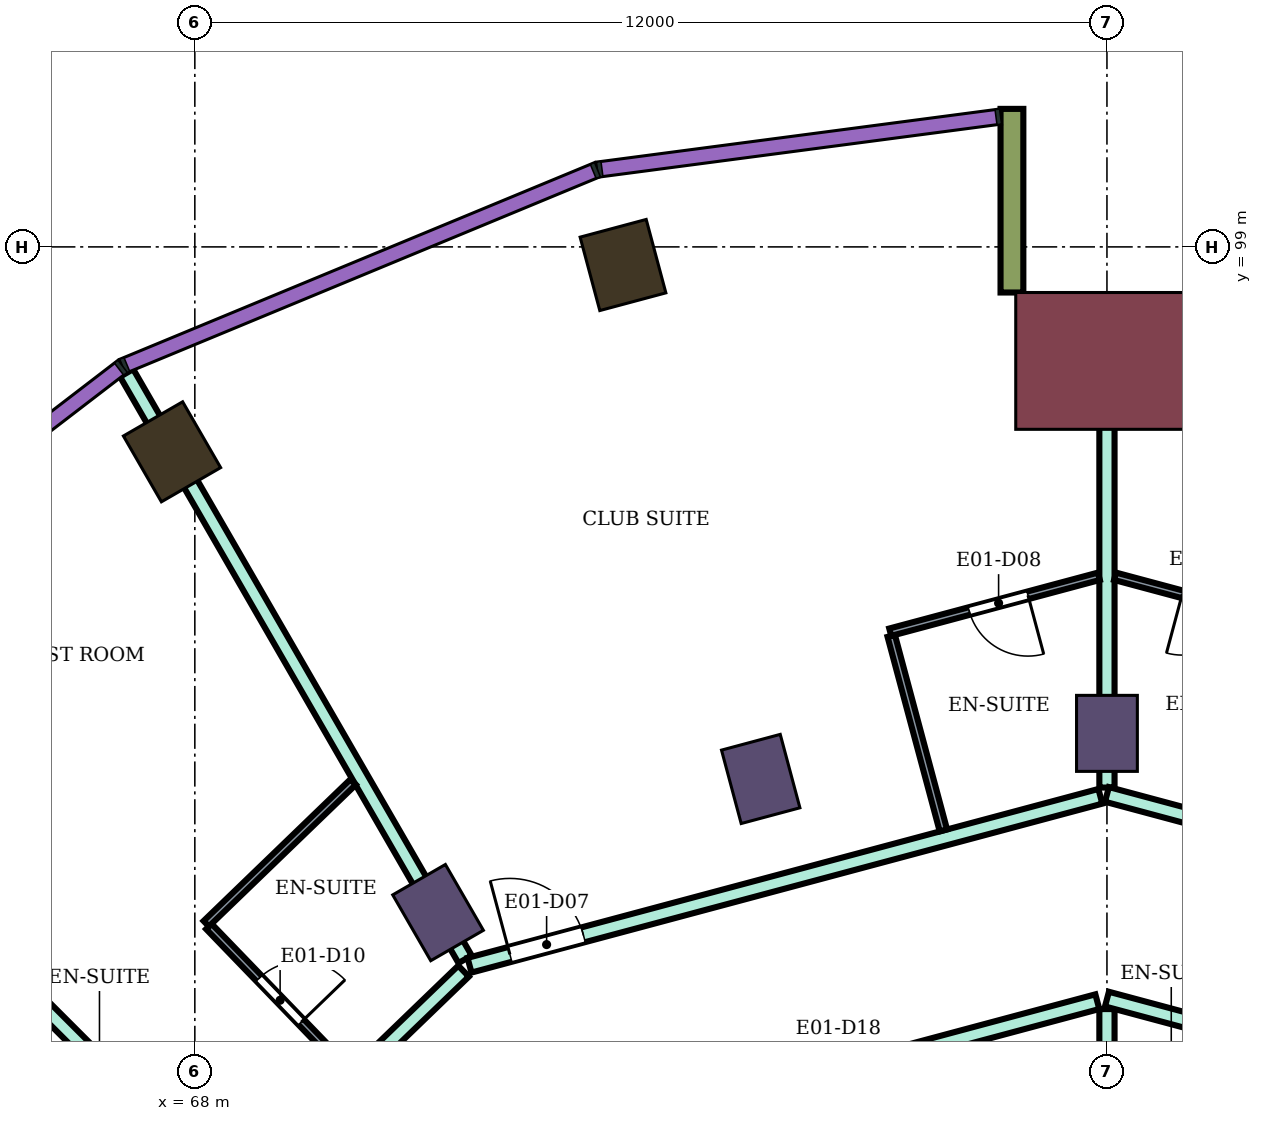
"""IFC4 building model, lengths in metres.
Left out: names, types, materials, properties, quantities, classifications, styles, units other than length and angle.
Written with IfcOpenShell. Run it as: python <this file> out.ifc"""

import sys

from ifc_helpers import new_model, si_unit, direction, frame, frame_2d, origin, origin_2d, place, context, subcontext, project, spatial, rectangle, extrude, element, fill, save


model = new_model("IFC4")
c1 = context("Model", 3, precision=1e-05, world=origin(), true_north=direction((0.0, 1.0)))
c2 = subcontext(c1, "Body", "Model", "MODEL_VIEW")
j1 = project(units=[si_unit("LENGTHUNIT", "METRE"), si_unit("PLANEANGLEUNIT", "RADIAN")], contexts=[c1])
p1 = place(None, origin())
s1 = spatial("IfcSite", under=j1, at=p1, CompositionType="ELEMENT")
p2 = place(p1, origin())
s2 = spatial("IfcBuilding", under=s1, at=p2, CompositionType="ELEMENT")
p3 = place(p2, frame((0.0, 0.0, 122.4)))
s3 = spatial("IfcBuildingStorey", under=s2, at=p3, CompositionType="ELEMENT", Elevation=122.4)
for number, where, z_axis, x_axis in (
    (1, (73.633, 98.762, 0.0), (0.0, 0.0, 1.0), (-0.259, 0.966, 0.0)),
    (2, (67.7, 96.304, 0.0), (0.0, 0.0, 1.0), (-0.5, 0.866, 0.0)),
):
    element("IfcColumn", number, at=place(p3, frame(where, z_axis=z_axis, x_axis=x_axis)), inside=s3, PredefinedType="COLUMN", context=c2, shape_type="SweptSolid", body=[
        extrude(rectangle(XDim=1.0, YDim=0.9, at=origin_2d()), origin(), (0.0, 0.0, 1.0), 3.9),
    ])
for number, where, z_axis, x_axis in (
    (3, (80.0, 92.6, 0.0), (0.0, 0.0, 1.0), (0.0, 1.0, 0.0)),
    (4, (75.445, 92.0, 0.0), (0.0, 0.0, 1.0), (-0.259, 0.966, 0.0)),
    (5, (71.2, 90.242, 0.0), (0.0, 0.0, 1.0), (-0.5, 0.866, 0.0)),
):
    element("IfcColumn", number, at=place(p3, frame(where, z_axis=z_axis, x_axis=x_axis)), inside=s3, PredefinedType="COLUMN", context=c2, shape_type="SweptSolid", body=[
        extrude(rectangle(XDim=1.0, YDim=0.8, at=origin_2d()), origin(), (0.0, 0.0, 1.0), 3.9),
    ])
p4 = place(p3, frame((80.0, 97.5, 0.0), z_axis=(0.0, 0.0, 1.0), x_axis=(0.0, 1.0, 0.0)))
e6 = element("IfcColumn", 6, at=p4, inside=s3, PredefinedType="COLUMN", context=c2, shape_type="SweptSolid", body=[
    extrude(rectangle(XDim=1.8, YDim=2.4, at=origin_2d()), origin(), (0.0, 0.0, 1.0), 3.9),
])
p5 = place(p3, frame((78.75, 98.4, 0.0), z_axis=(0.0, 0.0, 1.0), x_axis=(0.0, 1.0, 0.0)))
e7 = element("IfcWall", 7, at=p5, inside=s3, PredefinedType="NOTDEFINED", context=c2, shape_type="SweptSolid", body=[
    extrude(rectangle(XDim=2.416, YDim=0.3, at=frame_2d((1.208, 0.0))), origin(), (0.0, 0.0, 1.0), 3.9),
])
p6 = place(p3, frame((63.598, 91.408, 0.0), z_axis=(0.0, 0.0, 1.0), x_axis=(0.706963264491, -0.707250268759, 0.0)))
e8 = element("IfcWall", 8, at=p6, inside=s3, PredefinedType="PARTITIONING", context=c2, shape_type="SweptSolid", body=[
    extrude(rectangle(XDim=6.805, YDim=0.2, at=frame_2d((3.403, 0.0))), origin(), (0.0, 0.0, 1.0), 3.45),
])
p7 = place(p3, frame((66.797, 84.9, 0.0), z_axis=(0.0, 0.0, 1.0), x_axis=(0.719692092412, 0.694293376116, 0.0)))
e9 = element("IfcWall", 9, at=p7, inside=s3, PredefinedType="PARTITIONING", context=c2, shape_type="SweptSolid", body=[
    extrude(rectangle(XDim=6.584, YDim=0.2, at=frame_2d((3.292, 0.0))), origin(), (0.0, 0.0, 1.0), 3.45),
])
p8 = place(p7, frame((2.866, 0.0, 0.0)))
e10 = element("IfcOpeningElement", 10, at=p8, cuts=e9, PredefinedType="OPENING", context=c2, shape_type="SweptSolid", body=[
    extrude(rectangle(XDim=1.0, YDim=2.1, at=frame_2d((0.5, 1.05))), frame((0.0, 0.11, 0.0), z_axis=(0.0, -1.0, 0.0), x_axis=(1.0, 0.0, 0.0)), (0.0, 0.0, 1.0), 0.22),
])
p9 = place(p3, frame((67.102, 97.342, 0.0), z_axis=(0.0, 0.0, 1.0), x_axis=(0.499927298089, -0.866067374183, 0.0)))
e11 = element("IfcWall", 11, at=p9, inside=s3, PredefinedType="PARTITIONING", context=c2, shape_type="SweptSolid", body=[
    extrude(rectangle(XDim=8.907, YDim=0.2, at=frame_2d((4.454, 0.0))), origin(), (0.0, 0.0, 1.0), 3.45),
])
p10 = place(p3, frame((71.614, 89.55, 0.0), z_axis=(0.0, 0.0, 1.0), x_axis=(0.965967958589, 0.258661753994, 0.0)))
e12 = element("IfcWall", 12, at=p10, inside=s3, PredefinedType="PARTITIONING", context=c2, shape_type="SweptSolid", body=[
    extrude(rectangle(XDim=8.592, YDim=0.2, at=frame_2d((4.296, 0.0))), origin(), (0.0, 0.0, 1.0), 3.45),
])
p11 = place(p10, frame((0.55, 0.0, 0.0)))
e13 = element("IfcOpeningElement", 13, at=p11, cuts=e12, PredefinedType="OPENING", context=c2, shape_type="SweptSolid", body=[
    extrude(rectangle(XDim=1.0, YDim=2.1, at=frame_2d((0.5, 1.05))), frame((0.0, 0.11, 0.0), z_axis=(0.0, -1.0, 0.0), x_axis=(1.0, 0.0, 0.0)), (0.0, 0.0, 1.0), 0.22),
])
p12 = place(p3, frame((72.936, 87.211, 0.0), z_axis=(0.0, 0.0, 1.0), x_axis=(0.965917703859, 0.258849356521, 0.0)))
e14 = element("IfcWall", 14, at=p12, inside=s3, PredefinedType="PARTITIONING", context=c2, shape_type="SweptSolid", body=[
    extrude(rectangle(XDim=7.182, YDim=0.2, at=frame_2d((3.591, 0.0))), origin(), (0.0, 0.0, 1.0), 3.45),
])
p13 = place(p12, frame((2.757, 0.0, 0.0)))
e15 = element("IfcOpeningElement", 15, at=p13, cuts=e14, PredefinedType="OPENING", context=c2, shape_type="SweptSolid", body=[
    extrude(rectangle(XDim=1.8, YDim=2.1, at=frame_2d((0.9, 1.05))), frame((0.0, 0.11, 0.0), z_axis=(0.0, -1.0, 0.0), x_axis=(1.0, 0.0, 0.0)), (0.0, 0.0, 1.0), 0.22),
])
p14 = place(p3, frame((80.0, 82.7, 0.0), z_axis=(0.0, 0.0, 1.0), x_axis=(0.0, 1.0, 0.0)))
e16 = element("IfcWall", 16, at=p14, inside=s3, PredefinedType="PARTITIONING", context=c2, shape_type="SweptSolid", body=[
    extrude(rectangle(XDim=6.273, YDim=0.2, at=frame_2d((3.136, 0.0))), origin(), (0.0, 0.0, 1.0), 3.45),
])
p15 = place(p3, frame((80.0, 89.104, 0.0), z_axis=(0.0, 0.0, 1.0), x_axis=(0.965856548257, -0.259077455964, 0.0)))
e17 = element("IfcWall", 17, at=p15, inside=s3, PredefinedType="PARTITIONING", context=c2, shape_type="SweptSolid", body=[
    extrude(rectangle(XDim=7.173, YDim=0.2, at=frame_2d((3.586, 0.0))), origin(), (0.0, 0.0, 1.0), 3.45),
])
p16 = place(p15, frame((5.763, 0.0, 0.0)))
e18 = element("IfcOpeningElement", 18, at=p16, cuts=e17, PredefinedType="OPENING", context=c2, shape_type="SweptSolid", body=[
    extrude(rectangle(XDim=1.0, YDim=2.1, at=frame_2d((0.5, 1.05))), frame((0.0, 0.11, 0.0), z_axis=(0.0, -1.0, 0.0), x_axis=(1.0, 0.0, 0.0)), (0.0, 0.0, 1.0), 0.22),
])
p17 = place(p3, frame((80.0, 91.887, 0.0), z_axis=(0.0, 0.0, 1.0), x_axis=(0.0, 1.0, 0.0)))
e19 = element("IfcWall", 19, at=p17, inside=s3, PredefinedType="PARTITIONING", context=c2, shape_type="SweptSolid", body=[
    extrude(rectangle(XDim=6.312, YDim=0.2, at=frame_2d((3.156, 0.0))), origin(), (0.0, 0.0, 1.0), 3.45),
])
p18 = place(p3, frame((80.0, 91.797, 0.0), z_axis=(0.0, 0.0, 1.0), x_axis=(0.965857042792, -0.259075612301, 0.0)))
e20 = element("IfcWall", 20, at=p18, inside=s3, PredefinedType="PARTITIONING", context=c2, shape_type="SweptSolid", body=[
    extrude(rectangle(XDim=8.602, YDim=0.2, at=frame_2d((4.301, 0.0))), origin(), (0.0, 0.0, 1.0), 3.45),
])
p19 = place(p18, frame((4.877, 0.0, 0.0)))
e21 = element("IfcOpeningElement", 21, at=p19, cuts=e20, PredefinedType="OPENING", context=c2, shape_type="SweptSolid", body=[
    extrude(rectangle(XDim=1.0, YDim=2.1, at=frame_2d((0.5, 1.05))), frame((0.0, 0.11, 0.0), z_axis=(0.0, -1.0, 0.0), x_axis=(1.0, 0.0, 0.0)), (0.0, 0.0, 1.0), 0.22),
])
p20 = place(p18, frame((2.817, 0.0, 0.0)))
e22 = element("IfcOpeningElement", 22, at=p20, cuts=e20, PredefinedType="OPENING", context=c2, shape_type="SweptSolid", body=[
    extrude(rectangle(XDim=1.0, YDim=2.1, at=frame_2d((0.5, 1.05))), frame((0.0, 0.11, 0.0), z_axis=(0.0, -1.0, 0.0), x_axis=(1.0, 0.0, 0.0)), (0.0, 0.0, 1.0), 0.22),
])
p21 = place(p3, frame((68.185, 90.06, 0.0), z_axis=(0.0, 0.0, 1.0), x_axis=(0.69446127412, -0.719530081892, 0.0)))
e23 = element("IfcWall", 23, at=p21, inside=s3, PredefinedType="PARTITIONING", context=c2, shape_type="SweptSolid", body=[
    extrude(rectangle(XDim=2.649, YDim=0.1, at=frame_2d((1.324, 0.0))), origin(), (0.0, 0.0, 1.0), 3.45),
])
p22 = place(p21, frame((0.95, 0.0, 0.0)))
e24 = element("IfcOpeningElement", 24, at=p22, cuts=e23, PredefinedType="OPENING", context=c2, shape_type="SweptSolid", body=[
    extrude(rectangle(XDim=0.8, YDim=2.1, at=frame_2d((0.4, 1.05))), frame((0.0, 0.06, 0.0), z_axis=(0.0, -1.0, 0.0), x_axis=(1.0, 0.0, 0.0)), (0.0, 0.0, 1.0), 0.12),
])
p23 = place(p3, frame((68.15, 90.096, 0.0), z_axis=(0.0, 0.0, 1.0), x_axis=(0.719667544954, 0.694318820672, 0.0)))
e25 = element("IfcWall", 25, at=p23, inside=s3, PredefinedType="PARTITIONING", context=c2, shape_type="SweptSolid", body=[
    extrude(rectangle(XDim=2.687, YDim=0.1, at=frame_2d((1.344, 0.0))), origin(), (0.0, 0.0, 1.0), 3.45),
])
p24 = place(p3, frame((77.162, 93.883, 0.0), z_axis=(0.0, 0.0, 1.0), x_axis=(0.258998589493, -0.965877699629, 0.0)))
e26 = element("IfcWall", 26, at=p24, inside=s3, PredefinedType="PARTITIONING", context=c2, shape_type="SweptSolid", body=[
    extrude(rectangle(XDim=2.65, YDim=0.1, at=frame_2d((1.325, 0.0))), origin(), (0.0, 0.0, 1.0), 3.45),
])
p25 = place(p3, frame((77.149, 93.931, 0.0), z_axis=(0.0, 0.0, 1.0), x_axis=(0.965916219953, 0.258854893776, 0.0)))
e27 = element("IfcWall", 27, at=p25, inside=s3, PredefinedType="PARTITIONING", context=c2, shape_type="SweptSolid", body=[
    extrude(rectangle(XDim=2.842, YDim=0.1, at=frame_2d((1.421, 0.0))), origin(), (0.0, 0.0, 1.0), 3.45),
])
p26 = place(p25, frame((1.076, 0.0, 0.0)))
e28 = element("IfcOpeningElement", 28, at=p26, cuts=e27, PredefinedType="OPENING", context=c2, shape_type="SweptSolid", body=[
    extrude(rectangle(XDim=0.8, YDim=2.1, at=frame_2d((0.4, 1.05))), frame((0.0, 0.06, 0.0), z_axis=(0.0, -1.0, 0.0), x_axis=(1.0, 0.0, 0.0)), (0.0, 0.0, 1.0), 0.12),
])
p27 = place(p3, frame((80.106, 94.667, 0.0), z_axis=(0.0, 0.0, 1.0), x_axis=(0.965904298007, -0.258899376382, 0.0)))
e29 = element("IfcWall", 29, at=p27, inside=s3, PredefinedType="PARTITIONING", context=c2, shape_type="SweptSolid", body=[
    extrude(rectangle(XDim=2.69, YDim=0.1, at=frame_2d((1.345, 0.0))), origin(), (0.0, 0.0, 1.0), 3.45),
])
p28 = place(p27, frame((0.915, 0.0, 0.0)))
e30 = element("IfcOpeningElement", 30, at=p28, cuts=e29, PredefinedType="OPENING", context=c2, shape_type="SweptSolid", body=[
    extrude(rectangle(XDim=0.8, YDim=2.1, at=frame_2d((0.4, 1.05))), frame((0.0, 0.06, 0.0), z_axis=(0.0, -1.0, 0.0), x_axis=(1.0, 0.0, 0.0)), (0.0, 0.0, 1.0), 0.12),
])
p29 = place(p28, frame((0.8, 0.0, 0.0), z_axis=(0.0, 0.0, 1.0), x_axis=(-1.0, 0.0, 0.0)))
e31 = element("IfcDoor", 31, at=p29, inside=s3, OperationType="SINGLE_SWING_RIGHT", PredefinedType="DOOR", context=c2, shape_type="SweptSolid", body=[
    extrude(rectangle(XDim=0.8, YDim=2.1, at=frame_2d((0.4, 1.05))), frame((0.0, 0.025, 0.0), z_axis=(0.0, -1.0, 0.0), x_axis=(1.0, 0.0, 0.0)), (0.0, 0.0, 1.0), 0.05),
])
fill(e30, e31)
p30 = place(p11, origin())
e32 = element("IfcDoor", 32, at=p30, inside=s3, OperationType="SINGLE_SWING_LEFT", PredefinedType="DOOR", context=c2, shape_type="SweptSolid", body=[
    extrude(rectangle(XDim=1.0, YDim=2.1, at=frame_2d((0.5, 1.05))), frame((0.0, 0.025, 0.0), z_axis=(0.0, -1.0, 0.0), x_axis=(1.0, 0.0, 0.0)), (0.0, 0.0, 1.0), 0.05),
])
fill(e13, e32)
p31 = place(p26, frame((0.8, 0.0, 0.0), z_axis=(0.0, 0.0, 1.0), x_axis=(-1.0, 0.0, 0.0)))
e33 = element("IfcDoor", 33, at=p31, inside=s3, OperationType="SINGLE_SWING_LEFT", PredefinedType="DOOR", context=c2, shape_type="SweptSolid", body=[
    extrude(rectangle(XDim=0.8, YDim=2.1, at=frame_2d((0.4, 1.05))), frame((0.0, 0.025, 0.0), z_axis=(0.0, -1.0, 0.0), x_axis=(1.0, 0.0, 0.0)), (0.0, 0.0, 1.0), 0.05),
])
fill(e28, e33)
p32 = place(p22, origin())
e34 = element("IfcDoor", 34, at=p32, inside=s3, OperationType="SINGLE_SWING_RIGHT", PredefinedType="DOOR", context=c2, shape_type="SweptSolid", body=[
    extrude(rectangle(XDim=0.8, YDim=2.1, at=frame_2d((0.4, 1.05))), frame((0.0, 0.025, 0.0), z_axis=(0.0, -1.0, 0.0), x_axis=(1.0, 0.0, 0.0)), (0.0, 0.0, 1.0), 0.05),
])
fill(e24, e34)
save(model, sys.argv[1])
